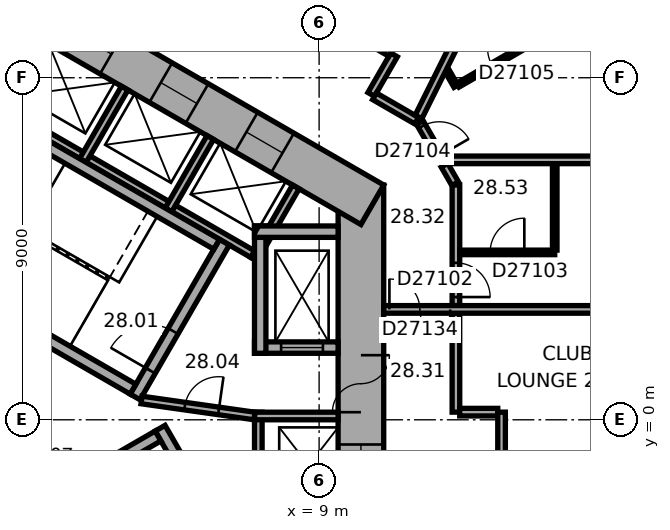
"""IFC4 building model, lengths in metres.
Left out: names, types, materials, properties, quantities, classifications, styles, units other than length and angle.
Written with IfcOpenShell. Run it as: python <this file> out.ifc"""

import sys

from ifc_helpers import new_model, si_unit, direction, frame, frame_2d, origin, place, context, subcontext, project, spatial, rectangle, extrude, element, fill, save


model = new_model("IFC4")
c1 = context("Model", 3, precision=1e-05, world=origin(), true_north=direction((0.0, 1.0)))
c2 = subcontext(c1, "Body", "Model", "MODEL_VIEW")
j1 = project(units=[si_unit("LENGTHUNIT", "METRE"), si_unit("PLANEANGLEUNIT", "RADIAN")], contexts=[c1])
p1 = place(None, origin())
s1 = spatial("IfcSite", under=j1, at=p1, CompositionType="ELEMENT")
p2 = place(p1, origin())
s2 = spatial("IfcBuilding", under=s1, at=p2, CompositionType="ELEMENT")
p3 = place(p2, frame((0.0, 0.0, 116.6)))
s3 = spatial("IfcBuildingStorey", under=s2, at=p3, CompositionType="ELEMENT", Elevation=116.6)
p4 = place(p3, frame((10.1, -6.177, 0.0), z_axis=(0.0, 0.0, 1.0), x_axis=(0.0, 1.0, 0.0)))
e1 = element("IfcWall", 1, at=p4, inside=s3, PredefinedType="SHEAR", context=c2, shape_type="SweptSolid", body=[
    extrude(rectangle(XDim=12.355, YDim=1.2, at=frame_2d((6.177, 0.0))), origin(), (0.0, 0.0, 1.0), 3.3),
])
p5 = place(p4, frame((6.378, 0.0, 0.0)))
e2 = element("IfcOpeningElement", 2, at=p5, cuts=e1, PredefinedType="OPENING", context=c2, shape_type="SweptSolid", body=[
    extrude(rectangle(XDim=1.5, YDim=2.1, at=frame_2d((0.75, 1.05))), frame((0.0, 0.61, 0.0), z_axis=(0.0, -1.0, 0.0), x_axis=(1.0, 0.0, 0.0)), (0.0, 0.0, 1.0), 1.22),
])
p6 = place(p4, frame((1.828, 0.0, 0.0)))
e3 = element("IfcOpeningElement", 3, at=p6, cuts=e1, PredefinedType="OPENING", context=c2, shape_type="SweptSolid", body=[
    extrude(rectangle(XDim=1.1, YDim=2.1, at=frame_2d((0.55, 1.05))), frame((0.0, 0.61, 0.0), z_axis=(0.0, -1.0, 0.0), x_axis=(1.0, 0.0, 0.0)), (0.0, 0.0, 1.0), 1.22),
])
p7 = place(p4, frame((4.427, 0.0, 0.0)))
e4 = element("IfcOpeningElement", 4, at=p7, cuts=e1, PredefinedType="OPENING", context=c2, shape_type="SweptSolid", body=[
    extrude(rectangle(XDim=1.1, YDim=2.1, at=frame_2d((0.55, 1.05))), frame((0.0, 0.61, 0.0), z_axis=(0.0, -1.0, 0.0), x_axis=(1.0, 0.0, 0.0)), (0.0, 0.0, 1.0), 1.22),
])
p8 = place(p3, frame((10.4, 5.658, 0.0), z_axis=(0.0, 0.0, 1.0), x_axis=(-0.866021384402, 0.500006961711, 0.0)))
e5 = element("IfcWall", 5, at=p8, inside=s3, PredefinedType="SHEAR", context=c2, shape_type="SweptSolid", body=[
    extrude(rectangle(XDim=12.355, YDim=1.2, at=frame_2d((6.178, 0.0))), origin(), (0.0, 0.0, 1.0), 3.3),
])
p9 = place(p8, frame((2.728, 0.0, 0.0)))
e6 = element("IfcOpeningElement", 6, at=p9, cuts=e5, PredefinedType="OPENING", context=c2, shape_type="SweptSolid", body=[
    extrude(rectangle(XDim=1.1, YDim=2.1, at=frame_2d((0.55, 1.05))), frame((0.0, 0.61, 0.0), z_axis=(0.0, -1.0, 0.0), x_axis=(1.0, 0.0, 0.0)), (0.0, 0.0, 1.0), 1.22),
])
p10 = place(p8, frame((5.328, 0.0, 0.0)))
e7 = element("IfcOpeningElement", 7, at=p10, cuts=e5, PredefinedType="OPENING", context=c2, shape_type="SweptSolid", body=[
    extrude(rectangle(XDim=1.1, YDim=2.1, at=frame_2d((0.55, 1.05))), frame((0.0, 0.61, 0.0), z_axis=(0.0, -1.0, 0.0), x_axis=(1.0, 0.0, 0.0)), (0.0, 0.0, 1.0), 1.22),
])
p11 = place(p8, frame((7.928, 0.0, 0.0)))
e8 = element("IfcOpeningElement", 8, at=p11, cuts=e5, PredefinedType="OPENING", context=c2, shape_type="SweptSolid", body=[
    extrude(rectangle(XDim=1.1, YDim=2.1, at=frame_2d((0.55, 1.05))), frame((0.0, 0.61, 0.0), z_axis=(0.0, -1.0, 0.0), x_axis=(1.0, 0.0, 0.0)), (0.0, 0.0, 1.0), 1.22),
])
p12 = place(p3, frame((7.4, -5.2, 0.0), z_axis=(0.0, 0.0, 1.0), x_axis=(0.0, 1.0, 0.0)))
e9 = element("IfcWall", 9, at=p12, inside=s3, PredefinedType="PARTITIONING", context=c2, shape_type="SweptSolid", body=[
    extrude(rectangle(XDim=5.4, YDim=0.2, at=frame_2d((2.7, 0.0))), origin(), (0.0, 0.0, 1.0), 2.95),
])
p13 = place(p3, frame((7.3, 0.1, 0.0), z_axis=(0.0, 0.0, 1.0), x_axis=(1.0, 0.0, 0.0)))
e10 = element("IfcWall", 10, at=p13, inside=s3, PredefinedType="PARTITIONING", context=c2, shape_type="SweptSolid", body=[
    extrude(rectangle(XDim=2.2, YDim=0.2, at=frame_2d((1.1, 0.0))), origin(), (0.0, 0.0, 1.0), 2.95),
])
p14 = place(p3, frame((7.424, 4.259, 0.0), z_axis=(0.0, 0.0, 1.0), x_axis=(-0.866026010844, 0.49999894854, 0.0)))
e11 = element("IfcWall", 11, at=p14, inside=s3, PredefinedType="PARTITIONING", context=c2, shape_type="SweptSolid", body=[
    extrude(rectangle(XDim=8.0, YDim=0.2, at=frame_2d((4.0, 0.0))), origin(), (0.0, 0.0, 1.0), 2.95),
])
for number, where, z_axis, x_axis in (
    (12, (7.287, 4.222, 0.0), (0.0, 0.0, 1.0), (0.5, 0.866, 0.0)),
    (13, (5.036, 5.522, 0.0), (0.0, 0.0, 1.0), (0.5, 0.866, 0.0)),
    (14, (2.784, 6.822, 0.0), (0.0, 0.0, 1.0), (0.5, 0.866, 0.0)),
):
    element("IfcWall", number, at=place(p3, frame(where, z_axis=z_axis, x_axis=x_axis)), inside=s3, PredefinedType="PARTITIONING", context=c2, shape_type="SweptSolid", body=[
        extrude(rectangle(XDim=2.2, YDim=0.2, at=frame_2d((1.1, 0.0))), origin(), (0.0, 0.0, 1.0), 2.95),
    ])
p15 = place(p3, frame((4.158, 0.602, 0.0), z_axis=(0.0, 0.0, 1.0), x_axis=(0.499977259774, 0.866038532462, 0.0)))
e15 = element("IfcWall", 15, at=p15, inside=s3, PredefinedType="SHEAR", context=c2, shape_type="SweptSolid", body=[
    extrude(rectangle(XDim=4.7, YDim=0.3, at=frame_2d((2.35, 0.0))), origin(), (0.0, 0.0, 1.0), 2.95),
])
p16 = place(p15, frame((0.8, 0.0, 0.0)))
e16 = element("IfcOpeningElement", 16, at=p16, cuts=e15, PredefinedType="OPENING", context=c2, shape_type="SweptSolid", body=[
    extrude(rectangle(XDim=1.2, YDim=2.1, at=frame_2d((0.6, 1.05))), frame((0.0, 0.16, 0.0), z_axis=(0.0, -1.0, 0.0), x_axis=(1.0, 0.0, 0.0)), (0.0, 0.0, 1.0), 0.32),
])
for number, where, z_axis, x_axis in (
    (17, (4.103, 0.807, 0.0), (0.0, 0.0, 1.0), (-0.866, 0.5, 0.0)),
    (18, (6.303, 4.617, 0.0), (0.0, 0.0, 1.0), (-0.866, 0.5, 0.0)),
):
    element("IfcWall", number, at=place(p3, frame(where, z_axis=z_axis, x_axis=x_axis)), inside=s3, PredefinedType="SHEAR", context=c2, shape_type="SweptSolid", body=[
        extrude(rectangle(XDim=7.06, YDim=0.3, at=frame_2d((3.53, 0.0))), origin(), (0.0, 0.0, 1.0), 2.95),
    ])
p17 = place(p3, frame((4.816, -0.222, 0.0), z_axis=(0.0, 0.0, 1.0), x_axis=(0.499977259774, -0.866038532462, 0.0)))
e19 = element("IfcWall", 19, at=p17, inside=s3, PredefinedType="SHEAR", context=c2, shape_type="SweptSolid", body=[
    extrude(rectangle(XDim=4.7, YDim=0.3, at=frame_2d((2.35, 0.0))), origin(), (0.0, 0.0, 1.0), 2.95),
])
p18 = place(p3, frame((-1.353, -3.957, 0.0), z_axis=(0.0, 0.0, 1.0), x_axis=(0.866027801685, 0.499995846692, 0.0)))
e20 = element("IfcWall", 20, at=p18, inside=s3, PredefinedType="SHEAR", context=c2, shape_type="SweptSolid", body=[
    extrude(rectangle(XDim=7.06, YDim=0.3, at=frame_2d((3.53, 0.0))), origin(), (0.0, 0.0, 1.0), 2.95),
])
p19 = place(p3, frame((7.3, 1.9, 0.0), z_axis=(0.0, 0.0, 1.0), x_axis=(1.0, 0.0, 0.0)))
e21 = element("IfcWall", 21, at=p19, inside=s3, PredefinedType="SHEAR", context=c2, shape_type="SweptSolid", body=[
    extrude(rectangle(XDim=2.2, YDim=0.3, at=frame_2d((1.1, 0.0))), origin(), (0.0, 0.0, 1.0), 2.95),
])
p20 = place(p19, frame((0.7, 0.0, 0.0)))
e22 = element("IfcOpeningElement", 22, at=p20, cuts=e21, PredefinedType="OPENING", context=c2, shape_type="SweptSolid", body=[
    extrude(rectangle(XDim=1.1, YDim=2.1, at=frame_2d((0.55, 1.05))), frame((0.0, 0.16, 0.0), z_axis=(0.0, -1.0, 0.0), x_axis=(1.0, 0.0, 0.0)), (0.0, 0.0, 1.0), 0.32),
])
p21 = place(p3, frame((7.45, 1.75, 0.0), z_axis=(0.0, 0.0, 1.0), x_axis=(0.0, 1.0, 0.0)))
e23 = element("IfcWall", 23, at=p21, inside=s3, PredefinedType="SHEAR", context=c2, shape_type="SweptSolid", body=[
    extrude(rectangle(XDim=3.35, YDim=0.3, at=frame_2d((1.675, 0.0))), origin(), (0.0, 0.0, 1.0), 2.95),
])
p22 = place(p3, frame((7.3, 4.95, 0.0), z_axis=(0.0, 0.0, 1.0), x_axis=(1.0, 0.0, 0.0)))
e24 = element("IfcWall", 24, at=p22, inside=s3, PredefinedType="SHEAR", context=c2, shape_type="SweptSolid", body=[
    extrude(rectangle(XDim=2.2, YDim=0.3, at=frame_2d((1.1, 0.0))), origin(), (0.0, 0.0, 1.0), 2.95),
])
p23 = place(p3, frame((4.327, 0.521, 0.0), z_axis=(0.0, 0.0, 1.0), x_axis=(0.990124376366, -0.14019172346, 0.0)))
e25 = element("IfcWall", 25, at=p23, inside=s3, PredefinedType="PARTITIONING", context=c2, shape_type="SweptSolid", body=[
    extrude(rectangle(XDim=3.002, YDim=0.2, at=frame_2d((1.501, 0.0))), origin(), (0.0, 0.0, 1.0), 2.95),
])
p24 = place(p23, frame((1.15, 0.0, 0.0)))
e26 = element("IfcOpeningElement", 26, at=p24, cuts=e25, PredefinedType="OPENING", context=c2, shape_type="SweptSolid", body=[
    extrude(rectangle(XDim=0.9, YDim=2.1, at=frame_2d((0.45, 1.05))), frame((0.0, 0.11, 0.0), z_axis=(0.0, -1.0, 0.0), x_axis=(1.0, 0.0, 0.0)), (0.0, 0.0, 1.0), 0.22),
])
p25 = place(p3, frame((10.371, 8.561, 0.0), z_axis=(0.0, 0.0, 1.0), x_axis=(0.499986357472, 0.866033280158, 0.0)))
e27 = element("IfcWall", 27, at=p25, inside=s3, PredefinedType="PARTITIONING", context=c2, shape_type="SweptSolid", body=[
    extrude(rectangle(XDim=1.201, YDim=0.2, at=frame_2d((0.601, 0.0))), origin(), (0.0, 0.0, 1.0), 2.95),
])
p26 = place(p3, frame((10.885, 9.652, 0.0), z_axis=(0.0, 0.0, 1.0), x_axis=(-0.866033868542, 0.499985338323, 0.0)))
e28 = element("IfcWall", 28, at=p26, inside=s3, PredefinedType="PARTITIONING", context=c2, shape_type="SweptSolid", body=[
    extrude(rectangle(XDim=8.602, YDim=0.2, at=frame_2d((4.301, 0.0))), origin(), (0.0, 0.0, 1.0), 2.95),
])
p27 = place(p26, frame((1.464, 0.0, 0.0)))
e29 = element("IfcOpeningElement", 29, at=p27, cuts=e28, PredefinedType="OPENING", context=c2, shape_type="SweptSolid", body=[
    extrude(rectangle(XDim=0.9, YDim=2.1, at=frame_2d((0.45, 1.05))), frame((0.0, 0.11, 0.0), z_axis=(0.0, -1.0, 0.0), x_axis=(1.0, 0.0, 0.0)), (0.0, 0.0, 1.0), 0.22),
])
p28 = place(p26, frame((7.09, 0.0, 0.0)))
e30 = element("IfcOpeningElement", 30, at=p28, cuts=e28, PredefinedType="OPENING", context=c2, shape_type="SweptSolid", body=[
    extrude(rectangle(XDim=0.9, YDim=2.1, at=frame_2d((0.45, 1.05))), frame((0.0, 0.11, 0.0), z_axis=(0.0, -1.0, 0.0), x_axis=(1.0, 0.0, 0.0)), (0.0, 0.0, 1.0), 0.22),
])
p29 = place(p3, frame((11.566, 7.871, 0.0), z_axis=(0.0, 0.0, 1.0), x_axis=(-0.866004557827, 0.500036104519, 0.0)))
e31 = element("IfcWall", 31, at=p29, inside=s3, PredefinedType="PARTITIONING", context=c2, shape_type="SweptSolid", body=[
    extrude(rectangle(XDim=1.28, YDim=0.2, at=frame_2d((0.64, 0.0))), origin(), (0.0, 0.0, 1.0), 2.95),
])
p30 = place(p3, frame((12.218, 6.839, 0.0), z_axis=(0.0, 0.0, 1.0), x_axis=(-0.500044870432, 0.865999496279, 0.0)))
e32 = element("IfcWall", 32, at=p30, inside=s3, PredefinedType="PARTITIONING", context=c2, shape_type="SweptSolid", body=[
    extrude(rectangle(XDim=1.136, YDim=0.2, at=frame_2d((0.568, 0.0))), origin(), (0.0, 0.0, 1.0), 2.95),
])
p31 = place(p30, frame((0.118, 0.0, 0.0)))
e33 = element("IfcOpeningElement", 33, at=p31, cuts=e32, PredefinedType="OPENING", context=c2, shape_type="SweptSolid", body=[
    extrude(rectangle(XDim=0.9, YDim=2.1, at=frame_2d((0.45, 1.05))), frame((0.0, 0.11, 0.0), z_axis=(0.0, -1.0, 0.0), x_axis=(1.0, 0.0, 0.0)), (0.0, 0.0, 1.0), 0.22),
])
p32 = place(p3, frame((12.58, 6.212, 0.0), z_axis=(0.0, 0.0, 1.0), x_axis=(-0.499936258447, 0.86606220186, 0.0)))
e34 = element("IfcWall", 34, at=p32, inside=s3, PredefinedType="PARTITIONING", context=c2, shape_type="SweptSolid", body=[
    extrude(rectangle(XDim=0.56, YDim=0.2, at=frame_2d((0.28, 0.0))), origin(), (0.0, 0.0, 1.0), 2.95),
])
p33 = place(p3, frame((12.6, 0.201, 0.0), z_axis=(0.0, 0.0, 1.0), x_axis=(0.0, 1.0, 0.0)))
e35 = element("IfcWall", 35, at=p33, inside=s3, PredefinedType="PARTITIONING", context=c2, shape_type="SweptSolid", body=[
    extrude(rectangle(XDim=2.604, YDim=0.2, at=frame_2d((1.302, 0.0))), origin(), (0.0, 0.0, 1.0), 2.95),
])
p34 = place(p3, frame((12.6, 3.004, 0.0), z_axis=(0.0, 0.0, 1.0), x_axis=(0.0, 1.0, 0.0)))
e36 = element("IfcWall", 36, at=p34, inside=s3, PredefinedType="PARTITIONING", context=c2, shape_type="SweptSolid", body=[
    extrude(rectangle(XDim=3.173, YDim=0.2, at=frame_2d((1.586, 0.0))), origin(), (0.0, 0.0, 1.0), 2.95),
])
p35 = place(p34, frame((0.225, 0.0, 0.0)))
e37 = element("IfcOpeningElement", 37, at=p35, cuts=e36, PredefinedType="OPENING", context=c2, shape_type="SweptSolid", body=[
    extrude(rectangle(XDim=0.9, YDim=2.1, at=frame_2d((0.45, 1.05))), frame((0.0, 0.11, 0.0), z_axis=(0.0, -1.0, 0.0), x_axis=(1.0, 0.0, 0.0)), (0.0, 0.0, 1.0), 0.22),
])
p36 = place(p3, frame((12.601, 8.776, 0.0), z_axis=(0.0, 0.0, 1.0), x_axis=(-0.500166486798, 0.865929261247, 0.0)))
e38 = element("IfcWall", 38, at=p36, inside=s3, PredefinedType="PARTITIONING", context=c2, shape_type="SweptSolid", body=[
    extrude(rectangle(XDim=0.476, YDim=0.12, at=frame_2d((0.238, 0.0))), origin(), (0.0, 0.0, 1.0), 2.95),
])
p37 = place(p3, frame((13.701, 0.201, 0.0), z_axis=(0.0, 0.0, 1.0), x_axis=(-1.0, 0.0, 0.0)))
e39 = element("IfcWall", 39, at=p37, inside=s3, PredefinedType="PARTITIONING", context=c2, shape_type="SweptSolid", body=[
    extrude(rectangle(XDim=1.001, YDim=0.2, at=frame_2d((0.5, 0.0))), origin(), (0.0, 0.0, 1.0), 2.95),
])
p38 = place(p3, frame((13.801, -5.501, 0.0), z_axis=(0.0, 0.0, 1.0), x_axis=(0.0, 1.0, 0.0)))
e40 = element("IfcWall", 40, at=p38, inside=s3, PredefinedType="PARTITIONING", context=c2, shape_type="SweptSolid", body=[
    extrude(rectangle(XDim=5.702, YDim=0.2, at=frame_2d((2.851, 0.0))), origin(), (0.0, 0.0, 1.0), 2.95),
])
p39 = place(p38, frame((2.619, 0.0, 0.0)))
e41 = element("IfcOpeningElement", 41, at=p39, cuts=e40, PredefinedType="OPENING", context=c2, shape_type="SweptSolid", body=[
    extrude(rectangle(XDim=1.0, YDim=2.1, at=frame_2d((0.5, 1.05))), frame((0.0, 0.11, 0.0), z_axis=(0.0, -1.0, 0.0), x_axis=(1.0, 0.0, 0.0)), (0.0, 0.0, 1.0), 0.22),
])
p40 = place(p3, frame((15.2, 4.405, 0.0), z_axis=(0.0, 0.0, 1.0), x_axis=(-1.0, 0.0, 0.0)))
e42 = element("IfcWall", 42, at=p40, inside=s3, PredefinedType="PARTITIONING", context=c2, shape_type="SweptSolid", body=[
    extrude(rectangle(XDim=2.5, YDim=0.12, at=frame_2d((1.25, 0.0))), origin(), (0.0, 0.0, 1.0), 2.95),
])
p41 = place(p40, frame((0.8, 0.0, 0.0)))
e43 = element("IfcOpeningElement", 43, at=p41, cuts=e42, PredefinedType="OPENING", context=c2, shape_type="SweptSolid", body=[
    extrude(rectangle(XDim=0.9, YDim=2.1, at=frame_2d((0.45, 1.05))), frame((0.0, 0.07, 0.0), z_axis=(0.0, -1.0, 0.0), x_axis=(1.0, 0.0, 0.0)), (0.0, 0.0, 1.0), 0.14),
])
p42 = place(p3, frame((15.2, 6.739, 0.0), z_axis=(0.0, 0.0, 1.0), x_axis=(0.0, -1.0, 0.0)))
e44 = element("IfcWall", 44, at=p42, inside=s3, PredefinedType="PARTITIONING", context=c2, shape_type="SweptSolid", body=[
    extrude(rectangle(XDim=2.274, YDim=0.12, at=frame_2d((1.137, 0.0))), origin(), (0.0, 0.0, 1.0), 2.95),
])
p43 = place(p3, frame((15.233, 10.296, 0.0), z_axis=(0.0, 0.0, 1.0), x_axis=(-0.866010940986, -0.500025049464, 0.0)))
e45 = element("IfcWall", 45, at=p43, inside=s3, PredefinedType="PARTITIONING", context=c2, shape_type="SweptSolid", body=[
    extrude(rectangle(XDim=2.98, YDim=0.12, at=frame_2d((1.49, 0.0))), origin(), (0.0, 0.0, 1.0), 2.95),
])
p44 = place(p43, frame((1.04, 0.0, 0.0)))
e46 = element("IfcOpeningElement", 46, at=p44, cuts=e45, PredefinedType="OPENING", context=c2, shape_type="SweptSolid", body=[
    extrude(rectangle(XDim=0.9, YDim=2.1, at=frame_2d((0.45, 1.05))), frame((0.0, 0.07, 0.0), z_axis=(0.0, -1.0, 0.0), x_axis=(1.0, 0.0, 0.0)), (0.0, 0.0, 1.0), 0.14),
])
p45 = place(p3, frame((15.915, 16.592, 0.0), z_axis=(0.0, 0.0, 1.0), x_axis=(-0.446199736347, -0.894933402709, 0.0)))
e47 = element("IfcWall", 47, at=p45, inside=s3, PredefinedType="PARTITIONING", context=c2, shape_type="SweptSolid", body=[
    extrude(rectangle(XDim=9.635, YDim=0.2, at=frame_2d((4.817, 0.0))), origin(), (0.0, 0.0, 1.0), 2.95),
])
p46 = place(p3, frame((21.95, 2.905, 0.0), z_axis=(0.0, 0.0, 1.0), x_axis=(-1.0, 0.0, 0.0)))
e48 = element("IfcWall", 48, at=p46, inside=s3, PredefinedType="PARTITIONING", context=c2, shape_type="SweptSolid", body=[
    extrude(rectangle(XDim=11.25, YDim=0.2, at=frame_2d((5.625, 0.0))), origin(), (0.0, 0.0, 1.0), 2.95),
])
p47 = place(p46, frame((9.5, 0.0, 0.0)))
e49 = element("IfcOpeningElement", 49, at=p47, cuts=e48, PredefinedType="OPENING", context=c2, shape_type="SweptSolid", body=[
    extrude(rectangle(XDim=1.6, YDim=2.1, at=frame_2d((0.8, 1.05))), frame((0.0, 0.11, 0.0), z_axis=(0.0, -1.0, 0.0), x_axis=(1.0, 0.0, 0.0)), (0.0, 0.0, 1.0), 0.22),
])
p48 = place(p3, frame((21.95, 6.839, 0.0), z_axis=(0.0, 0.0, 1.0), x_axis=(-1.0, 0.0, 0.0)))
e50 = element("IfcWall", 50, at=p48, inside=s3, PredefinedType="PARTITIONING", context=c2, shape_type="SweptSolid", body=[
    extrude(rectangle(XDim=9.65, YDim=0.2, at=frame_2d((4.825, 0.0))), origin(), (0.0, 0.0, 1.0), 2.95),
])
p49 = place(p5, origin())
e51 = element("IfcDoor", 51, at=p49, inside=s3, OperationType="DOUBLE_DOOR_SINGLE_SWING", PredefinedType="DOOR", context=c2, shape_type="SweptSolid", body=[
    extrude(rectangle(XDim=1.5, YDim=2.1, at=frame_2d((0.75, 1.05))), frame((0.0, 0.025, 0.0), z_axis=(0.0, -1.0, 0.0), x_axis=(1.0, 0.0, 0.0)), (0.0, 0.0, 1.0), 0.05),
])
fill(e2, e51)
p50 = place(p16, origin())
e52 = element("IfcDoor", 52, at=p50, inside=s3, OperationType="SINGLE_SWING_RIGHT", PredefinedType="DOOR", context=c2, shape_type="SweptSolid", body=[
    extrude(rectangle(XDim=1.2, YDim=2.1, at=frame_2d((0.6, 1.05))), frame((0.0, 0.025, 0.0), z_axis=(0.0, -1.0, 0.0), x_axis=(1.0, 0.0, 0.0)), (0.0, 0.0, 1.0), 0.05),
])
fill(e16, e52)
p51 = place(p24, origin())
e53 = element("IfcDoor", 53, at=p51, inside=s3, OperationType="SINGLE_SWING_LEFT", PredefinedType="DOOR", context=c2, shape_type="SweptSolid", body=[
    extrude(rectangle(XDim=0.9, YDim=2.1, at=frame_2d((0.45, 1.05))), frame((0.0, 0.025, 0.0), z_axis=(0.0, -1.0, 0.0), x_axis=(1.0, 0.0, 0.0)), (0.0, 0.0, 1.0), 0.05),
])
fill(e26, e53)
p52 = place(p20, origin())
e54 = element("IfcDoor", 54, at=p52, inside=s3, OperationType="DOUBLE_DOOR_SLIDING", PredefinedType="DOOR", context=c2, shape_type="SweptSolid", body=[
    extrude(rectangle(XDim=1.1, YDim=2.1, at=frame_2d((0.55, 1.05))), frame((0.0, 0.025, 0.0), z_axis=(0.0, -1.0, 0.0), x_axis=(1.0, 0.0, 0.0)), (0.0, 0.0, 1.0), 0.05),
])
fill(e22, e54)
p53 = place(p7, origin())
e55 = element("IfcDoor", 55, at=p53, inside=s3, OperationType="DOUBLE_DOOR_SLIDING", PredefinedType="DOOR", context=c2, shape_type="SweptSolid", body=[
    extrude(rectangle(XDim=1.1, YDim=2.1, at=frame_2d((0.55, 1.05))), frame((0.0, 0.025, 0.0), z_axis=(0.0, -1.0, 0.0), x_axis=(1.0, 0.0, 0.0)), (0.0, 0.0, 1.0), 0.05),
])
fill(e4, e55)
p54 = place(p9, origin())
e56 = element("IfcDoor", 56, at=p54, inside=s3, OperationType="DOUBLE_DOOR_SLIDING", PredefinedType="DOOR", context=c2, shape_type="SweptSolid", body=[
    extrude(rectangle(XDim=1.1, YDim=2.1, at=frame_2d((0.55, 1.05))), frame((0.0, 0.025, 0.0), z_axis=(0.0, -1.0, 0.0), x_axis=(1.0, 0.0, 0.0)), (0.0, 0.0, 1.0), 0.05),
])
fill(e6, e56)
p55 = place(p10, origin())
e57 = element("IfcDoor", 57, at=p55, inside=s3, OperationType="DOUBLE_DOOR_SLIDING", PredefinedType="DOOR", context=c2, shape_type="SweptSolid", body=[
    extrude(rectangle(XDim=1.1, YDim=2.1, at=frame_2d((0.55, 1.05))), frame((0.0, 0.025, 0.0), z_axis=(0.0, -1.0, 0.0), x_axis=(1.0, 0.0, 0.0)), (0.0, 0.0, 1.0), 0.05),
])
fill(e7, e57)
p56 = place(p11, origin())
e58 = element("IfcDoor", 58, at=p56, inside=s3, OperationType="DOUBLE_DOOR_SLIDING", PredefinedType="DOOR", context=c2, shape_type="SweptSolid", body=[
    extrude(rectangle(XDim=1.1, YDim=2.1, at=frame_2d((0.55, 1.05))), frame((0.0, 0.025, 0.0), z_axis=(0.0, -1.0, 0.0), x_axis=(1.0, 0.0, 0.0)), (0.0, 0.0, 1.0), 0.05),
])
fill(e8, e58)
p57 = place(p35, origin())
e59 = element("IfcDoor", 59, at=p57, inside=s3, OperationType="SINGLE_SWING_LEFT", PredefinedType="DOOR", context=c2, shape_type="SweptSolid", body=[
    extrude(rectangle(XDim=0.9, YDim=2.1, at=frame_2d((0.45, 1.05))), frame((0.0, 0.025, 0.0), z_axis=(0.0, -1.0, 0.0), x_axis=(1.0, 0.0, 0.0)), (0.0, 0.0, 1.0), 0.05),
])
fill(e37, e59)
p58 = place(p41, origin())
e60 = element("IfcDoor", 60, at=p58, inside=s3, OperationType="SINGLE_SWING_LEFT", PredefinedType="DOOR", context=c2, shape_type="SweptSolid", body=[
    extrude(rectangle(XDim=0.9, YDim=2.1, at=frame_2d((0.45, 1.05))), frame((0.0, 0.025, 0.0), z_axis=(0.0, -1.0, 0.0), x_axis=(1.0, 0.0, 0.0)), (0.0, 0.0, 1.0), 0.05),
])
fill(e43, e60)
p59 = place(p31, origin())
e61 = element("IfcDoor", 61, at=p59, inside=s3, OperationType="SINGLE_SWING_LEFT", PredefinedType="DOOR", context=c2, shape_type="SweptSolid", body=[
    extrude(rectangle(XDim=0.9, YDim=2.1, at=frame_2d((0.45, 1.05))), frame((0.0, 0.025, 0.0), z_axis=(0.0, -1.0, 0.0), x_axis=(1.0, 0.0, 0.0)), (0.0, 0.0, 1.0), 0.05),
])
fill(e33, e61)
p60 = place(p44, origin())
e62 = element("IfcDoor", 62, at=p60, inside=s3, OperationType="SINGLE_SWING_LEFT", PredefinedType="DOOR", context=c2, shape_type="SweptSolid", body=[
    extrude(rectangle(XDim=0.9, YDim=2.1, at=frame_2d((0.45, 1.05))), frame((0.0, 0.025, 0.0), z_axis=(0.0, -1.0, 0.0), x_axis=(1.0, 0.0, 0.0)), (0.0, 0.0, 1.0), 0.05),
])
fill(e46, e62)
p61 = place(p47, origin())
e63 = element("IfcDoor", 63, at=p61, inside=s3, OperationType="DOUBLE_DOOR_SINGLE_SWING", PredefinedType="DOOR", context=c2, shape_type="SweptSolid", body=[
    extrude(rectangle(XDim=1.6, YDim=2.1, at=frame_2d((0.8, 1.05))), frame((0.0, 0.025, 0.0), z_axis=(0.0, -1.0, 0.0), x_axis=(1.0, 0.0, 0.0)), (0.0, 0.0, 1.0), 0.05),
])
fill(e49, e63)
save(model, sys.argv[1])
